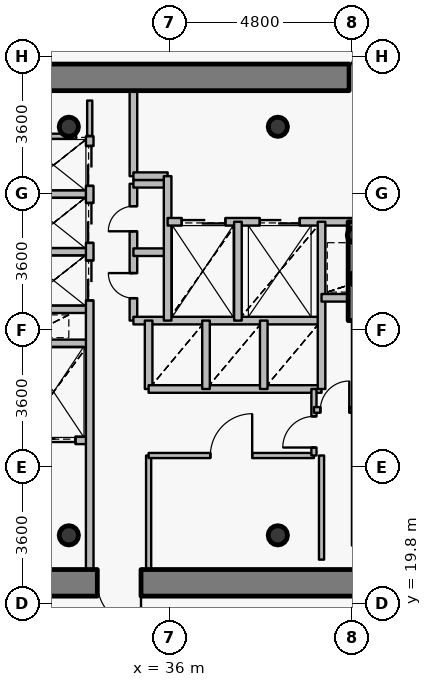
"""IFC4 building model, lengths in metres.
Left out: names, types, materials, properties, quantities, classifications, styles, units other than length and angle.
Written with IfcOpenShell. Run it as: python <this file> out.ifc"""

import sys

from ifc_helpers import new_model, si_unit, direction, frame, frame_2d, origin, origin_2d, place, context, subcontext, project, spatial, rectangle, hollow_circle, extrude, source, transform, mapped, element, fill, save


model = new_model("IFC4")
c1 = context("Model", 3, precision=1e-05, world=origin(), true_north=direction((0.0, 1.0)))
c2 = subcontext(c1, "Body", "Model", "MODEL_VIEW")
j1 = project(units=[si_unit("LENGTHUNIT", "METRE"), si_unit("PLANEANGLEUNIT", "RADIAN")], contexts=[c1])
p1 = place(None, origin())
s1 = spatial("IfcSite", under=j1, at=p1, CompositionType="ELEMENT")
p2 = place(p1, origin())
s2 = spatial("IfcBuilding", under=s1, at=p2, CompositionType="ELEMENT")
p3 = place(p2, frame((0.0, 0.0, 232.8)))
s3 = spatial("IfcBuildingStorey", under=s2, at=p3, CompositionType="ELEMENT", Elevation=232.8)
for number, where, z_axis, x_axis in (
    (1, (33.35, 21.6, 0.0), (0.0, 0.0, 1.0), (1.0, 0.0, 0.0)),
    (2, (38.85, 21.6, 0.0), (0.0, 0.0, 1.0), (1.0, 0.0, 0.0)),
    (3, (38.85, 32.35, 0.0), (0.0, 0.0, 1.0), (1.0, 0.0, 0.0)),
    (4, (33.35, 32.35, 0.0), (0.0, 0.0, 1.0), (1.0, 0.0, 0.0)),
):
    element("IfcColumn", number, at=place(p3, frame(where, z_axis=z_axis, x_axis=x_axis)), inside=s3, PredefinedType="COLUMN", context=c2, shape_type="SweptSolid", body=[
        extrude(hollow_circle(Radius=0.254, WallThickness=0.02, at=origin_2d()), origin(), (0.0, 0.0, 1.0), 3.75),
    ])
for number, where, z_axis, x_axis in (
    (5, (40.95, 28.35, 0.0), (0.0, 0.0, 1.0), (1.0, 0.0, 0.0)),
    (6, (40.88, 29.5, 0.0), (0.0, 0.0, 1.0), (1.0, 0.0, 0.0)),
):
    element("IfcColumn", number, at=place(p3, frame(where, z_axis=z_axis, x_axis=x_axis)), inside=s3, PredefinedType="COLUMN", context=c2, shape_type="SweptSolid", body=[
        extrude(hollow_circle(Radius=0.203, WallThickness=0.016, at=origin_2d()), origin(), (0.0, 0.0, 1.0), 3.75),
    ])
p4 = place(p3, frame((27.05, 33.65, 0.0), z_axis=(0.0, 0.0, 1.0), x_axis=(1.0, 0.0, 0.0)))
e7 = element("IfcWall", 7, at=p4, inside=s3, PredefinedType="SHEAR", context=c2, shape_type="SweptSolid", body=[
    extrude(rectangle(XDim=17.9, YDim=0.7, at=frame_2d((8.95, 0.0))), origin(), (0.0, 0.0, 1.0), 3.05),
])
p5 = place(p4, frame((13.675, 0.0, 0.0)))
e8 = element("IfcOpeningElement", 8, at=p5, cuts=e7, PredefinedType="OPENING", context=c2, shape_type="SweptSolid", body=[
    extrude(rectangle(XDim=1.15, YDim=2.15, at=origin_2d()), frame((0.575, 0.36, 1.075), z_axis=(0.0, -1.0, 0.0), x_axis=(1.0, 0.0, 0.0)), (0.0, 0.0, 1.0), 0.72),
])
p6 = place(p3, frame((44.95, 20.35, 0.0), z_axis=(0.0, 0.0, 1.0), x_axis=(-1.0, 0.0, 0.0)))
e9 = element("IfcWall", 9, at=p6, inside=s3, PredefinedType="SHEAR", context=c2, shape_type="SweptSolid", body=[
    extrude(rectangle(XDim=17.9, YDim=0.7, at=frame_2d((8.95, 0.0))), origin(), (0.0, 0.0, 1.0), 3.05),
])
p7 = place(p6, frame((9.7, 0.0, 0.0)))
e10 = element("IfcOpeningElement", 10, at=p7, cuts=e9, PredefinedType="OPENING", context=c2, shape_type="SweptSolid", body=[
    extrude(rectangle(XDim=1.15, YDim=2.15, at=origin_2d()), frame((0.575, 0.36, 1.075), z_axis=(0.0, -1.0, 0.0), x_axis=(1.0, 0.0, 0.0)), (0.0, 0.0, 1.0), 0.72),
])
p8 = place(p3, frame((40.9, 27.25, 0.0), z_axis=(0.0, 0.0, 1.0), x_axis=(0.0, 1.0, 0.0)))
e11 = element("IfcWall", 11, at=p8, inside=s3, PredefinedType="SHEAR", context=c2, shape_type="SweptSolid", body=[
    extrude(rectangle(XDim=2.6, YDim=0.4, at=frame_2d((1.3, 0.0))), origin(), (0.0, 0.0, 1.0), 3.1),
])
p9 = place(p3, frame((32.0, 24.1, 0.0), z_axis=(0.0, 0.0, 1.0), x_axis=(1.0, 0.0, 0.0)))
e12 = element("IfcWall", 12, at=p9, inside=s3, PredefinedType="PARTITIONING", context=c2, shape_type="SweptSolid", body=[
    extrude(rectangle(XDim=1.9, YDim=0.2, at=frame_2d((0.95, 0.0))), origin(), (0.0, 0.0, 1.0), 3.085),
])
p10 = place(p9, frame((0.375, 0.0, 0.0)))
e13 = element("IfcOpeningElement", 13, at=p10, cuts=e12, PredefinedType="OPENING", context=c2, shape_type="SweptSolid", body=[
    extrude(rectangle(XDim=1.15, YDim=2.15, at=origin_2d()), frame((0.575, 0.11, 1.075), z_axis=(0.0, -1.0, 0.0), x_axis=(1.0, 0.0, 0.0)), (0.0, 0.0, 1.0), 0.22),
])
for number, where, z_axis, x_axis in (
    (14, (32.0, 26.65, 0.0), (0.0, 0.0, 1.0), (1.0, 0.0, 0.0)),
    (15, (32.0, 27.55, 0.0), (0.0, 0.0, 1.0), (1.0, 0.0, 0.0)),
    (16, (32.0, 29.06, 0.0), (0.0, 0.0, 1.0), (1.0, 0.0, 0.0)),
    (17, (32.0, 30.58, 0.0), (0.0, 0.0, 1.0), (1.0, 0.0, 0.0)),
):
    element("IfcWall", number, at=place(p3, frame(where, z_axis=z_axis, x_axis=x_axis)), inside=s3, PredefinedType="PARTITIONING", context=c2, shape_type="SweptSolid", body=[
        extrude(rectangle(XDim=1.9, YDim=0.2, at=frame_2d((0.95, 0.0))), origin(), (0.0, 0.0, 1.0), 3.085),
    ])
p11 = place(p3, frame((33.9, 20.7, 0.0), z_axis=(0.0, 0.0, 1.0), x_axis=(0.0, 1.0, 0.0)))
e18 = element("IfcWall", 18, at=p11, inside=s3, PredefinedType="PARTITIONING", context=c2, shape_type="SweptSolid", body=[
    extrude(rectangle(XDim=11.4, YDim=0.2, at=frame_2d((5.7, 0.0))), origin(), (0.0, 0.0, 1.0), 3.085),
])
p12 = place(p11, frame((7.08, 0.0, 0.0)))
e19 = element("IfcOpeningElement", 19, at=p12, cuts=e18, PredefinedType="OPENING", context=c2, shape_type="SweptSolid", body=[
    extrude(rectangle(XDim=1.05, YDim=2.15, at=origin_2d()), frame((0.525, 0.11, 1.075), z_axis=(0.0, -1.0, 0.0), x_axis=(1.0, 0.0, 0.0)), (0.0, 0.0, 1.0), 0.22),
])
p13 = place(p11, frame((8.595, 0.0, 0.0)))
e20 = element("IfcOpeningElement", 20, at=p13, cuts=e18, PredefinedType="OPENING", context=c2, shape_type="SweptSolid", body=[
    extrude(rectangle(XDim=1.05, YDim=2.15, at=origin_2d()), frame((0.525, 0.11, 1.075), z_axis=(0.0, -1.0, 0.0), x_axis=(1.0, 0.0, 0.0)), (0.0, 0.0, 1.0), 0.22),
])
p14 = place(p11, frame((10.095, 0.0, 0.0)))
e21 = element("IfcOpeningElement", 21, at=p14, cuts=e18, PredefinedType="OPENING", context=c2, shape_type="SweptSolid", body=[
    extrude(rectangle(XDim=1.05, YDim=2.15, at=origin_2d()), frame((0.525, 0.11, 1.075), z_axis=(0.0, -1.0, 0.0), x_axis=(1.0, 0.0, 0.0)), (0.0, 0.0, 1.0), 0.22),
])
p15 = place(p3, frame((35.05, 27.25, 0.0), z_axis=(0.0, 0.0, 1.0), x_axis=(0.0, 1.0, 0.0)))
e22 = element("IfcWall", 22, at=p15, inside=s3, PredefinedType="PARTITIONING", context=c2, shape_type="SweptSolid", body=[
    extrude(rectangle(XDim=3.6, YDim=0.2, at=frame_2d((1.8, 0.0))), origin(), (0.0, 0.0, 1.0), 3.5),
])
p16 = place(p15, frame((0.59, 0.0, 0.0)))
e23 = element("IfcOpeningElement", 23, at=p16, cuts=e22, PredefinedType="OPENING", context=c2, shape_type="SweptSolid", body=[
    extrude(rectangle(XDim=0.66, YDim=2.05, at=origin_2d()), frame((0.33, 0.11, 1.025), z_axis=(0.0, -1.0, 0.0), x_axis=(1.0, 0.0, 0.0)), (0.0, 0.0, 1.0), 0.22),
])
p17 = place(p15, frame((2.35, 0.0, 0.0)))
e24 = element("IfcOpeningElement", 24, at=p17, cuts=e22, PredefinedType="OPENING", context=c2, shape_type="SweptSolid", body=[
    extrude(rectangle(XDim=0.66, YDim=2.05, at=origin_2d()), frame((0.33, 0.11, 1.025), z_axis=(0.0, -1.0, 0.0), x_axis=(1.0, 0.0, 0.0)), (0.0, 0.0, 1.0), 0.22),
])
p18 = place(p3, frame((35.05, 27.25, 0.0), z_axis=(0.0, 0.0, 1.0), x_axis=(1.0, 0.0, 0.0)))
e25 = element("IfcWall", 25, at=p18, inside=s3, PredefinedType="PARTITIONING", context=c2, shape_type="SweptSolid", body=[
    extrude(rectangle(XDim=4.95, YDim=0.2, at=frame_2d((2.475, 0.0))), origin(), (0.0, 0.0, 1.0), 3.085),
])
for number, where, z_axis, x_axis in (
    (26, (35.05, 29.05, 0.0), (0.0, 0.0, 1.0), (1.0, 0.0, 0.0)),
    (27, (35.05, 30.85, 0.0), (0.0, 0.0, 1.0), (1.0, 0.0, 0.0)),
):
    element("IfcWall", number, at=place(p3, frame(where, z_axis=z_axis, x_axis=x_axis)), inside=s3, PredefinedType="PARTITIONING", context=c2, shape_type="SweptSolid", body=[
        extrude(rectangle(XDim=0.9, YDim=0.2, at=frame_2d((0.45, 0.0))), origin(), (0.0, 0.0, 1.0), 3.5),
    ])
p19 = place(p3, frame((35.05, 31.05, 0.0), z_axis=(0.0, 0.0, 1.0), x_axis=(0.0, 1.0, 0.0)))
e28 = element("IfcWall", 28, at=p19, inside=s3, PredefinedType="PARTITIONING", context=c2, shape_type="SweptSolid", body=[
    extrude(rectangle(XDim=2.25, YDim=0.2, at=frame_2d((1.125, 0.0))), origin(), (0.0, 0.0, 1.0), 3.085),
])
p20 = place(p3, frame((35.05, 31.05, 0.0), z_axis=(0.0, 0.0, 1.0), x_axis=(1.0, 0.0, 0.0)))
e29 = element("IfcWall", 29, at=p20, inside=s3, PredefinedType="PARTITIONING", context=c2, shape_type="SweptSolid", body=[
    extrude(rectangle(XDim=0.9, YDim=0.2, at=frame_2d((0.45, 0.0))), origin(), (0.0, 0.0, 1.0), 3.5),
])
p21 = place(p3, frame((35.45, 20.7, 0.0), z_axis=(0.0, 0.0, 1.0), x_axis=(0.0, 1.0, 0.0)))
e30 = element("IfcWall", 30, at=p21, inside=s3, PredefinedType="PARTITIONING", context=c2, shape_type="SweptSolid", body=[
    extrude(rectangle(XDim=3.0, YDim=0.135, at=frame_2d((1.5, 0.0))), origin(), (0.0, 0.0, 1.0), 3.085),
])
p22 = place(p3, frame((35.45, 23.7, 0.0), z_axis=(0.0, 0.0, 1.0), x_axis=(1.0, 0.0, 0.0)))
e31 = element("IfcWall", 31, at=p22, inside=s3, PredefinedType="PARTITIONING", context=c2, shape_type="SweptSolid", body=[
    extrude(rectangle(XDim=4.35, YDim=0.135, at=frame_2d((2.175, 0.0))), origin(), (0.0, 0.0, 1.0), 3.085),
])
p23 = place(p22, frame((1.625, 0.0, 0.0)))
e32 = element("IfcOpeningElement", 32, at=p23, cuts=e31, PredefinedType="OPENING", context=c2, shape_type="SweptSolid", body=[
    extrude(rectangle(XDim=1.1, YDim=2.15, at=origin_2d()), frame((0.55, 0.078, 1.075), z_axis=(0.0, -1.0, 0.0), x_axis=(1.0, 0.0, 0.0)), (0.0, 0.0, 1.0), 0.155),
])
p24 = place(p3, frame((35.45, 25.45, 0.0), z_axis=(0.0, 0.0, 1.0), x_axis=(0.0, 1.0, 0.0)))
e33 = element("IfcWall", 33, at=p24, inside=s3, PredefinedType="PARTITIONING", context=c2, shape_type="SweptSolid", body=[
    extrude(rectangle(XDim=1.8, YDim=0.2, at=frame_2d((0.9, 0.0))), origin(), (0.0, 0.0, 1.0), 3.5),
])
p25 = place(p3, frame((35.45, 25.45, 0.0), z_axis=(0.0, 0.0, 1.0), x_axis=(1.0, 0.0, 0.0)))
e34 = element("IfcWall", 34, at=p25, inside=s3, PredefinedType="PARTITIONING", context=c2, shape_type="SweptSolid", body=[
    extrude(rectangle(XDim=4.55, YDim=0.2, at=frame_2d((2.275, 0.0))), origin(), (0.0, 0.0, 1.0), 3.085),
])
p26 = place(p3, frame((35.95, 27.25, 0.0), z_axis=(0.0, 0.0, 1.0), x_axis=(0.0, 1.0, 0.0)))
e35 = element("IfcWall", 35, at=p26, inside=s3, PredefinedType="PARTITIONING", context=c2, shape_type="SweptSolid", body=[
    extrude(rectangle(XDim=3.8, YDim=0.2, at=frame_2d((1.9, 0.0))), origin(), (0.0, 0.0, 1.0), 3.5),
])
p27 = place(p3, frame((35.95, 29.85, 0.0), z_axis=(0.0, 0.0, 1.0), x_axis=(1.0, 0.0, 0.0)))
e36 = element("IfcWall", 36, at=p27, inside=s3, PredefinedType="PARTITIONING", context=c2, shape_type="SweptSolid", body=[
    extrude(rectangle(XDim=8.49, YDim=0.2, at=frame_2d((4.245, 0.0))), origin(), (0.0, 0.0, 1.0), 3.085),
])
p28 = place(p27, frame((6.1, 0.0, 0.0)))
e37 = element("IfcOpeningElement", 37, at=p28, cuts=e36, PredefinedType="OPENING", context=c2, shape_type="SweptSolid", body=[
    extrude(rectangle(XDim=1.2, YDim=2.15, at=origin_2d()), frame((0.6, 0.11, 1.075), z_axis=(0.0, -1.0, 0.0), x_axis=(1.0, 0.0, 0.0)), (0.0, 0.0, 1.0), 0.22),
])
p29 = place(p27, frame((0.37, 0.0, 0.0)))
e38 = element("IfcOpeningElement", 38, at=p29, cuts=e36, PredefinedType="OPENING", context=c2, shape_type="SweptSolid", body=[
    extrude(rectangle(XDim=1.15, YDim=2.15, at=origin_2d()), frame((0.575, 0.11, 1.075), z_axis=(0.0, -1.0, 0.0), x_axis=(1.0, 0.0, 0.0)), (0.0, 0.0, 1.0), 0.22),
])
p30 = place(p27, frame((2.425, 0.0, 0.0)))
e39 = element("IfcOpeningElement", 39, at=p30, cuts=e36, PredefinedType="OPENING", context=c2, shape_type="SweptSolid", body=[
    extrude(rectangle(XDim=1.05, YDim=2.15, at=origin_2d()), frame((0.525, 0.11, 1.075), z_axis=(0.0, -1.0, 0.0), x_axis=(1.0, 0.0, 0.0)), (0.0, 0.0, 1.0), 0.22),
])
p31 = place(p3, frame((36.96, 25.45, 0.0), z_axis=(0.0, 0.0, 1.0), x_axis=(0.0, 1.0, 0.0)))
e40 = element("IfcWall", 40, at=p31, inside=s3, PredefinedType="PARTITIONING", context=c2, shape_type="SweptSolid", body=[
    extrude(rectangle(XDim=1.8, YDim=0.2, at=frame_2d((0.9, 0.0))), origin(), (0.0, 0.0, 1.0), 3.5),
])
p32 = place(p3, frame((37.8, 27.25, 0.0), z_axis=(0.0, 0.0, 1.0), x_axis=(0.0, 1.0, 0.0)))
e41 = element("IfcWall", 41, at=p32, inside=s3, PredefinedType="PARTITIONING", context=c2, shape_type="SweptSolid", body=[
    extrude(rectangle(XDim=2.6, YDim=0.2, at=frame_2d((1.3, 0.0))), origin(), (0.0, 0.0, 1.0), 3.5),
])
p33 = place(p3, frame((38.48, 25.45, 0.0), z_axis=(0.0, 0.0, 1.0), x_axis=(0.0, 1.0, 0.0)))
e42 = element("IfcWall", 42, at=p33, inside=s3, PredefinedType="PARTITIONING", context=c2, shape_type="SweptSolid", body=[
    extrude(rectangle(XDim=1.8, YDim=0.2, at=frame_2d((0.9, 0.0))), origin(), (0.0, 0.0, 1.0), 3.5),
])
p34 = place(p3, frame((39.8, 23.7, 0.0), z_axis=(0.0, 0.0, 1.0), x_axis=(0.0, 1.0, 0.0)))
e43 = element("IfcWall", 43, at=p34, inside=s3, PredefinedType="PARTITIONING", context=c2, shape_type="SweptSolid", body=[
    extrude(rectangle(XDim=1.75, YDim=0.135, at=frame_2d((0.875, 0.0))), origin(), (0.0, 0.0, 1.0), 3.5),
])
p35 = place(p34, frame((0.21, 0.0, 0.0)))
e44 = element("IfcOpeningElement", 44, at=p35, cuts=e43, PredefinedType="OPENING", context=c2, shape_type="SweptSolid", body=[
    extrude(rectangle(XDim=0.82, YDim=2.1, at=origin_2d()), frame((0.41, 0.078, 1.05), z_axis=(0.0, -1.0, 0.0), x_axis=(1.0, 0.0, 0.0)), (0.0, 0.0, 1.0), 0.155),
])
p36 = place(p3, frame((39.8, 24.9, 0.0), z_axis=(0.0, 0.0, 1.0), x_axis=(1.0, 0.0, 0.0)))
e45 = element("IfcWall", 45, at=p36, inside=s3, PredefinedType="PARTITIONING", context=c2, shape_type="SweptSolid", body=[
    extrude(rectangle(XDim=1.1, YDim=0.15, at=frame_2d((0.55, 0.0))), origin(), (0.0, 0.0, 1.0), 3.5),
])
p37 = place(p36, frame((0.17, 0.0, 0.0)))
e46 = element("IfcOpeningElement", 46, at=p37, cuts=e45, PredefinedType="OPENING", context=c2, shape_type="SweptSolid", body=[
    extrude(rectangle(XDim=0.76, YDim=2.1, at=origin_2d()), frame((0.38, 0.085, 1.05), z_axis=(0.0, -1.0, 0.0), x_axis=(1.0, 0.0, 0.0)), (0.0, 0.0, 1.0), 0.17),
])
p38 = place(p3, frame((40.0, 25.45, 0.0), z_axis=(0.0, 0.0, 1.0), x_axis=(0.0, 1.0, 0.0)))
e47 = element("IfcWall", 47, at=p38, inside=s3, PredefinedType="PARTITIONING", context=c2, shape_type="SweptSolid", body=[
    extrude(rectangle(XDim=4.4, YDim=0.2, at=frame_2d((2.2, 0.0))), origin(), (0.0, 0.0, 1.0), 3.5),
])
p39 = place(p3, frame((40.0, 27.85, 0.0), z_axis=(0.0, 0.0, 1.0), x_axis=(1.0, 0.0, 0.0)))
e48 = element("IfcWall", 48, at=p39, inside=s3, PredefinedType="PARTITIONING", context=c2, shape_type="SweptSolid", body=[
    extrude(rectangle(XDim=0.9, YDim=0.2, at=frame_2d((0.45, 0.0))), origin(), (0.0, 0.0, 1.0), 3.5),
])
p40 = place(p3, frame((40.9, 21.33, 0.0), z_axis=(0.0, 0.0, 1.0), x_axis=(0.0, 1.0, 0.0)))
e49 = element("IfcWall", 49, at=p40, inside=s3, PredefinedType="PARTITIONING", context=c2, shape_type="SweptSolid", body=[
    extrude(rectangle(XDim=5.91, YDim=0.2, at=frame_2d((2.955, 0.0))), origin(), (0.0, 0.0, 1.0), 3.035),
])
p41 = place(p3, frame((32.36, 32.1, 0.0), z_axis=(0.0, 0.0, 1.0), x_axis=(1.0, 0.0, 0.0)))
e50 = element("IfcWall", 50, at=p41, inside=s3, PredefinedType="PARTITIONING", context=c2, shape_type="SweptSolid", body=[
    extrude(rectangle(XDim=1.18, YDim=0.135, at=frame_2d((0.59, 0.0))), origin(), (0.0, 0.0, 1.0), 3.085),
])
p42 = place(p3, frame((40.0, 23.7, 0.0), z_axis=(0.0, 0.0, 1.0), x_axis=(0.0, -1.0, 0.0)))
e51 = element("IfcWall", 51, at=p42, inside=s3, PredefinedType="PARTITIONING", context=c2, shape_type="SweptSolid", body=[
    extrude(rectangle(XDim=2.74, YDim=0.135, at=frame_2d((1.37, 0.0))), origin(), (0.0, 0.0, 1.0), 3.035),
])
p43 = place(p3, frame((33.9, 32.11, 0.0), z_axis=(0.0, 0.0, 1.0), x_axis=(0.0, 1.0, 0.0)))
e52 = element("IfcWall", 52, at=p43, inside=s3, PredefinedType="PARTITIONING", context=c2, shape_type="SweptSolid", body=[
    extrude(rectangle(XDim=0.93, YDim=0.135, at=frame_2d((0.465, 0.0))), origin(), (0.0, 0.0, 1.0), 3.085),
])
m1 = source(origin(), c2, "Body", "SweptSolid", [
    extrude(rectangle(XDim=1.15, YDim=2.15, at=origin_2d()), frame((0.575, 0.025, 1.075), z_axis=(0.0, -1.0, 0.0), x_axis=(1.0, 0.0, 0.0)), (0.0, 0.0, 1.0), 0.05),
])
p44 = place(p5, origin())
e53 = element("IfcDoor", 53, at=p44, inside=s3, OperationType="SINGLE_SWING_RIGHT", PredefinedType="DOOR", context=c2, shape_type="MappedRepresentation", body=[
    mapped(m1, transform((0.0, 0.0, 0.0), x_axis=(1.0, 0.0, 0.0), y_axis=(0.0, 1.0, 0.0), z_axis=(0.0, 0.0, 1.0), scale=1.0)),
])
fill(e8, e53)
p45 = place(p7, origin())
e54 = element("IfcDoor", 54, at=p45, inside=s3, OperationType="SINGLE_SWING_LEFT", PredefinedType="DOOR", context=c2, shape_type="MappedRepresentation", body=[
    mapped(m1, transform((0.0, 0.0, 0.0), x_axis=(1.0, 0.0, 0.0), y_axis=(0.0, 1.0, 0.0), z_axis=(0.0, 0.0, 1.0), scale=1.0)),
])
fill(e10, e54)
m2 = source(origin(), c2, "Body", "SweptSolid", [
    extrude(rectangle(XDim=1.15, YDim=2.15, at=origin_2d()), frame((0.575, 0.025, 1.075), z_axis=(0.0, -1.0, 0.0), x_axis=(1.0, 0.0, 0.0)), (0.0, 0.0, 1.0), 0.05),
])
p46 = place(p29, origin())
e55 = element("IfcDoor", 55, at=p46, inside=s3, OperationType="DOUBLE_DOOR_SLIDING", PredefinedType="USERDEFINED", context=c2, shape_type="MappedRepresentation", body=[
    mapped(m2, transform((0.0, 0.0, 0.0), x_axis=(1.0, 0.0, 0.0), y_axis=(0.0, 1.0, 0.0), z_axis=(0.0, 0.0, 1.0), scale=1.0)),
])
fill(e38, e55)
p47 = place(p10, origin())
e56 = element("IfcDoor", 56, at=p47, inside=s3, OperationType="DOUBLE_DOOR_SLIDING", PredefinedType="USERDEFINED", context=c2, shape_type="MappedRepresentation", body=[
    mapped(m2, transform((0.0, 0.0, 0.0), x_axis=(1.0, 0.0, 0.0), y_axis=(0.0, 1.0, 0.0), z_axis=(0.0, 0.0, 1.0), scale=1.0)),
])
fill(e13, e56)
m3 = source(origin(), c2, "Body", "SweptSolid", [
    extrude(rectangle(XDim=1.05, YDim=2.15, at=origin_2d()), frame((0.525, 0.025, 1.075), z_axis=(0.0, -1.0, 0.0), x_axis=(1.0, 0.0, 0.0)), (0.0, 0.0, 1.0), 0.05),
])
p48 = place(p30, origin())
e57 = element("IfcDoor", 57, at=p48, inside=s3, OperationType="DOUBLE_DOOR_SLIDING", PredefinedType="USERDEFINED", context=c2, shape_type="MappedRepresentation", body=[
    mapped(m3, transform((0.0, 0.0, 0.0), x_axis=(1.0, 0.0, 0.0), y_axis=(0.0, 1.0, 0.0), z_axis=(0.0, 0.0, 1.0), scale=1.0)),
])
fill(e39, e57)
p49 = place(p12, origin())
e58 = element("IfcDoor", 58, at=p49, inside=s3, OperationType="DOUBLE_DOOR_SLIDING", PredefinedType="USERDEFINED", context=c2, shape_type="MappedRepresentation", body=[
    mapped(m3, transform((0.0, 0.0, 0.0), x_axis=(1.0, 0.0, 0.0), y_axis=(0.0, 1.0, 0.0), z_axis=(0.0, 0.0, 1.0), scale=1.0)),
])
fill(e19, e58)
p50 = place(p13, origin())
e59 = element("IfcDoor", 59, at=p50, inside=s3, OperationType="DOUBLE_DOOR_SLIDING", PredefinedType="USERDEFINED", context=c2, shape_type="MappedRepresentation", body=[
    mapped(m3, transform((0.0, 0.0, 0.0), x_axis=(1.0, 0.0, 0.0), y_axis=(0.0, 1.0, 0.0), z_axis=(0.0, 0.0, 1.0), scale=1.0)),
])
fill(e20, e59)
p51 = place(p14, origin())
e60 = element("IfcDoor", 60, at=p51, inside=s3, OperationType="DOUBLE_DOOR_SLIDING", PredefinedType="USERDEFINED", context=c2, shape_type="MappedRepresentation", body=[
    mapped(m3, transform((0.0, 0.0, 0.0), x_axis=(1.0, 0.0, 0.0), y_axis=(0.0, 1.0, 0.0), z_axis=(0.0, 0.0, 1.0), scale=1.0)),
])
fill(e21, e60)
m4 = source(origin(), c2, "Body", "SweptSolid", [
    extrude(rectangle(XDim=0.66, YDim=2.05, at=origin_2d()), frame((0.33, 0.025, 1.025), z_axis=(0.0, -1.0, 0.0), x_axis=(1.0, 0.0, 0.0)), (0.0, 0.0, 1.0), 0.05),
])
p52 = place(p16, origin())
e61 = element("IfcDoor", 61, at=p52, inside=s3, OperationType="SINGLE_SWING_RIGHT", PredefinedType="USERDEFINED", context=c2, shape_type="MappedRepresentation", body=[
    mapped(m4, transform((0.0, 0.0, 0.0), x_axis=(1.0, 0.0, 0.0), y_axis=(0.0, 1.0, 0.0), z_axis=(0.0, 0.0, 1.0), scale=1.0)),
])
fill(e23, e61)
p53 = place(p17, origin())
e62 = element("IfcDoor", 62, at=p53, inside=s3, OperationType="SINGLE_SWING_LEFT", PredefinedType="USERDEFINED", context=c2, shape_type="MappedRepresentation", body=[
    mapped(m4, transform((0.0, 0.0, 0.0), x_axis=(1.0, 0.0, 0.0), y_axis=(0.0, 1.0, 0.0), z_axis=(0.0, 0.0, 1.0), scale=1.0)),
])
fill(e24, e62)
m5 = source(origin(), c2, "Body", "SweptSolid", [
    extrude(rectangle(XDim=1.1, YDim=2.15, at=origin_2d()), frame((0.55, 0.025, 1.075), z_axis=(0.0, -1.0, 0.0), x_axis=(1.0, 0.0, 0.0)), (0.0, 0.0, 1.0), 0.05),
])
p54 = place(p23, origin())
e63 = element("IfcDoor", 63, at=p54, inside=s3, OperationType="SINGLE_SWING_RIGHT", PredefinedType="DOOR", context=c2, shape_type="MappedRepresentation", body=[
    mapped(m5, transform((0.0, 0.0, 0.0), x_axis=(1.0, 0.0, 0.0), y_axis=(0.0, 1.0, 0.0), z_axis=(0.0, 0.0, 1.0), scale=1.0)),
])
fill(e32, e63)
m6 = source(origin(), c2, "Body", "SweptSolid", [
    extrude(rectangle(XDim=0.82, YDim=2.1, at=origin_2d()), frame((0.41, 0.025, 1.05), z_axis=(0.0, -1.0, 0.0), x_axis=(1.0, 0.0, 0.0)), (0.0, 0.0, 1.0), 0.05),
])
p55 = place(p35, origin())
e64 = element("IfcDoor", 64, at=p55, inside=s3, OperationType="SINGLE_SWING_LEFT", PredefinedType="DOOR", context=c2, shape_type="MappedRepresentation", body=[
    mapped(m6, transform((0.0, 0.0, 0.0), x_axis=(1.0, 0.0, 0.0), y_axis=(0.0, 1.0, 0.0), z_axis=(0.0, 0.0, 1.0), scale=1.0)),
])
fill(e44, e64)
m7 = source(origin(), c2, "Body", "SweptSolid", [
    extrude(rectangle(XDim=0.76, YDim=2.1, at=origin_2d()), frame((0.38, 0.025, 1.05), z_axis=(0.0, -1.0, 0.0), x_axis=(1.0, 0.0, 0.0)), (0.0, 0.0, 1.0), 0.05),
])
p56 = place(p37, origin())
e65 = element("IfcDoor", 65, at=p56, inside=s3, OperationType="SINGLE_SWING_RIGHT", PredefinedType="DOOR", context=c2, shape_type="MappedRepresentation", body=[
    mapped(m7, transform((0.0, 0.0, 0.0), x_axis=(1.0, 0.0, 0.0), y_axis=(0.0, 1.0, 0.0), z_axis=(0.0, 0.0, 1.0), scale=1.0)),
])
fill(e46, e65)
save(model, sys.argv[1])
